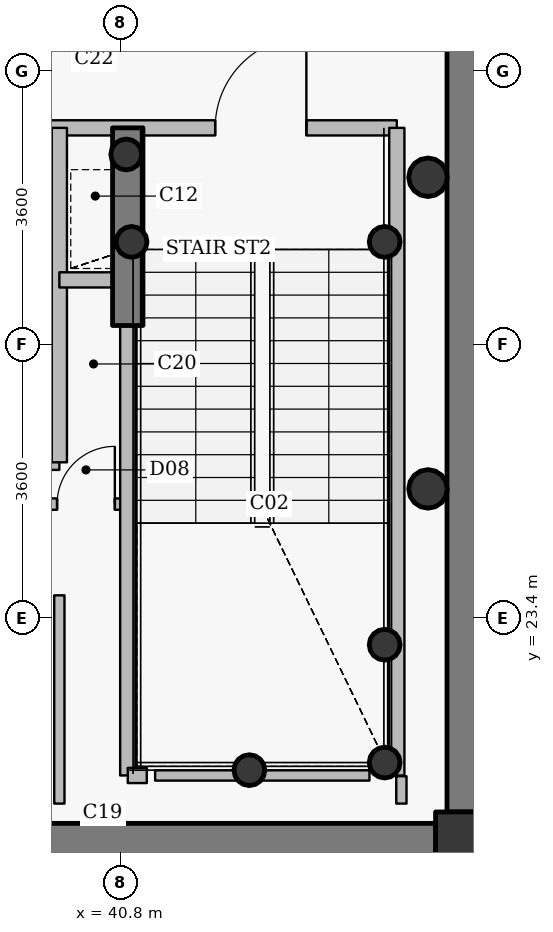
"""IFC4 building model, lengths in metres.
Left out: names, types, materials, properties, quantities, classifications, styles, units other than length and angle.
Written with IfcOpenShell. Run it as: python <this file> out.ifc"""

import sys

from ifc_helpers import new_model, si_unit, direction, frame, frame_2d, origin, origin_2d, place, context, subcontext, project, spatial, rectangle, hollow_circle, extrude, source, transform, mapped, element, fill, save


model = new_model("IFC4")
c1 = context("Model", 3, precision=1e-05, world=origin(), true_north=direction((0.0, 1.0)))
c2 = subcontext(c1, "Body", "Model", "MODEL_VIEW")
j1 = project(units=[si_unit("LENGTHUNIT", "METRE"), si_unit("PLANEANGLEUNIT", "RADIAN")], contexts=[c1])
p1 = place(None, origin())
s1 = spatial("IfcSite", under=j1, at=p1, CompositionType="ELEMENT")
p2 = place(p1, origin())
s2 = spatial("IfcBuilding", under=s1, at=p2, CompositionType="ELEMENT")
p3 = place(p2, frame((0.0, 0.0, 210.3)))
s3 = spatial("IfcBuildingStorey", under=s2, at=p3, CompositionType="ELEMENT", Elevation=210.3)
p4 = place(p3, frame((45.45, 20.35, 0.0), z_axis=(0.0, 0.0, 1.0), x_axis=(1.0, 0.0, 0.0)))
e1 = element("IfcColumn", 1, at=p4, inside=s3, PredefinedType="COLUMN", context=c2, shape_type="SweptSolid", body=[
    extrude(rectangle(XDim=1.0, YDim=1.0, at=origin_2d()), origin(), (0.0, 0.0, 1.0), 3.75),
])
for number, where, z_axis, x_axis in (
    (2, (44.28, 21.5, 0.0), (0.0, 0.0, 1.0), (1.0, 0.0, 0.0)),
    (3, (44.28, 23.05, 0.0), (0.0, 0.0, 1.0), (1.0, 0.0, 0.0)),
    (4, (42.5, 21.4, 0.0), (0.0, 0.0, 1.0), (1.0, 0.0, 0.0)),
    (5, (40.95, 28.35, 0.0), (0.0, 0.0, 1.0), (1.0, 0.0, 0.0)),
    (6, (44.28, 28.35, 0.0), (0.0, 0.0, 1.0), (1.0, 0.0, 0.0)),
    (7, (40.88, 29.5, 0.0), (0.0, 0.0, 1.0), (1.0, 0.0, 0.0)),
):
    element("IfcColumn", number, at=place(p3, frame(where, z_axis=z_axis, x_axis=x_axis)), inside=s3, PredefinedType="COLUMN", context=c2, shape_type="SweptSolid", body=[
        extrude(hollow_circle(Radius=0.203, WallThickness=0.016, at=origin_2d()), origin(), (0.0, 0.0, 1.0), 3.75),
    ])
p5 = place(p3, frame((45.45, 33.15, 0.0), z_axis=(0.0, 0.0, 1.0), x_axis=(0.0, -1.0, 0.0)))
e8 = element("IfcWall", 8, at=p5, inside=s3, PredefinedType="SHEAR", context=c2, shape_type="SweptSolid", body=[
    extrude(rectangle(XDim=12.3, YDim=0.7, at=frame_2d((6.15, 0.0))), origin(), (0.0, 0.0, 1.0), 3.05),
])
p6 = place(p3, frame((44.95, 20.35, 0.0), z_axis=(0.0, 0.0, 1.0), x_axis=(-1.0, 0.0, 0.0)))
e9 = element("IfcWall", 9, at=p6, inside=s3, PredefinedType="SHEAR", context=c2, shape_type="SweptSolid", body=[
    extrude(rectangle(XDim=17.9, YDim=0.7, at=frame_2d((8.95, 0.0))), origin(), (0.0, 0.0, 1.0), 3.05),
])
p7 = place(p6, frame((9.7, 0.0, 0.0)))
e10 = element("IfcOpeningElement", 10, at=p7, cuts=e9, PredefinedType="OPENING", context=c2, shape_type="SweptSolid", body=[
    extrude(rectangle(XDim=1.15, YDim=2.15, at=origin_2d()), frame((0.575, 0.36, 1.075), z_axis=(0.0, -1.0, 0.0), x_axis=(1.0, 0.0, 0.0)), (0.0, 0.0, 1.0), 0.72),
])
p8 = place(p3, frame((40.9, 27.25, 0.0), z_axis=(0.0, 0.0, 1.0), x_axis=(0.0, 1.0, 0.0)))
e11 = element("IfcWall", 11, at=p8, inside=s3, PredefinedType="SHEAR", context=c2, shape_type="SweptSolid", body=[
    extrude(rectangle(XDim=2.6, YDim=0.4, at=frame_2d((1.3, 0.0))), origin(), (0.0, 0.0, 1.0), 3.1),
])
for number, where, z_axis, x_axis in (
    (12, (44.85, 25.1, 0.0), (0.0, 0.0, 1.0), (1.0, 0.0, 0.0)),
    (13, (44.85, 29.2, 0.0), (0.0, 0.0, 1.0), (1.0, 0.0, 0.0)),
):
    element("IfcColumn", number, at=place(p3, frame(where, z_axis=z_axis, x_axis=x_axis)), inside=s3, PredefinedType="COLUMN", context=c2, shape_type="SweptSolid", body=[
        extrude(hollow_circle(Radius=0.254, WallThickness=0.02, at=origin_2d()), origin(), (0.0, 0.0, 1.0), 3.75),
    ])
p9 = place(p3, frame((35.05, 27.25, 0.0), z_axis=(0.0, 0.0, 1.0), x_axis=(1.0, 0.0, 0.0)))
e14 = element("IfcWall", 14, at=p9, inside=s3, PredefinedType="PARTITIONING", context=c2, shape_type="SweptSolid", body=[
    extrude(rectangle(XDim=4.95, YDim=0.2, at=frame_2d((2.475, 0.0))), origin(), (0.0, 0.0, 1.0), 3.085),
])
p10 = place(p3, frame((35.45, 25.45, 0.0), z_axis=(0.0, 0.0, 1.0), x_axis=(1.0, 0.0, 0.0)))
e15 = element("IfcWall", 15, at=p10, inside=s3, PredefinedType="PARTITIONING", context=c2, shape_type="SweptSolid", body=[
    extrude(rectangle(XDim=4.55, YDim=0.2, at=frame_2d((2.275, 0.0))), origin(), (0.0, 0.0, 1.0), 3.085),
])
p11 = place(p3, frame((35.95, 29.85, 0.0), z_axis=(0.0, 0.0, 1.0), x_axis=(1.0, 0.0, 0.0)))
e16 = element("IfcWall", 16, at=p11, inside=s3, PredefinedType="PARTITIONING", context=c2, shape_type="SweptSolid", body=[
    extrude(rectangle(XDim=8.49, YDim=0.2, at=frame_2d((4.245, 0.0))), origin(), (0.0, 0.0, 1.0), 3.085),
])
p12 = place(p11, frame((6.1, 0.0, 0.0)))
e17 = element("IfcOpeningElement", 17, at=p12, cuts=e16, PredefinedType="OPENING", context=c2, shape_type="SweptSolid", body=[
    extrude(rectangle(XDim=1.2, YDim=2.15, at=origin_2d()), frame((0.6, 0.11, 1.075), z_axis=(0.0, -1.0, 0.0), x_axis=(1.0, 0.0, 0.0)), (0.0, 0.0, 1.0), 0.22),
])
p13 = place(p11, frame((0.37, 0.0, 0.0)))
e18 = element("IfcOpeningElement", 18, at=p13, cuts=e16, PredefinedType="OPENING", context=c2, shape_type="SweptSolid", body=[
    extrude(rectangle(XDim=1.15, YDim=2.15, at=origin_2d()), frame((0.575, 0.11, 1.075), z_axis=(0.0, -1.0, 0.0), x_axis=(1.0, 0.0, 0.0)), (0.0, 0.0, 1.0), 0.22),
])
p14 = place(p11, frame((2.425, 0.0, 0.0)))
e19 = element("IfcOpeningElement", 19, at=p14, cuts=e16, PredefinedType="OPENING", context=c2, shape_type="SweptSolid", body=[
    extrude(rectangle(XDim=1.05, YDim=2.15, at=origin_2d()), frame((0.525, 0.11, 1.075), z_axis=(0.0, -1.0, 0.0), x_axis=(1.0, 0.0, 0.0)), (0.0, 0.0, 1.0), 0.22),
])
p15 = place(p3, frame((40.0, 25.45, 0.0), z_axis=(0.0, 0.0, 1.0), x_axis=(0.0, 1.0, 0.0)))
e20 = element("IfcWall", 20, at=p15, inside=s3, PredefinedType="PARTITIONING", context=c2, shape_type="SweptSolid", body=[
    extrude(rectangle(XDim=4.4, YDim=0.2, at=frame_2d((2.2, 0.0))), origin(), (0.0, 0.0, 1.0), 3.5),
])
p16 = place(p3, frame((40.0, 27.85, 0.0), z_axis=(0.0, 0.0, 1.0), x_axis=(1.0, 0.0, 0.0)))
e21 = element("IfcWall", 21, at=p16, inside=s3, PredefinedType="PARTITIONING", context=c2, shape_type="SweptSolid", body=[
    extrude(rectangle(XDim=0.9, YDim=0.2, at=frame_2d((0.45, 0.0))), origin(), (0.0, 0.0, 1.0), 3.5),
])
p17 = place(p3, frame((40.9, 21.33, 0.0), z_axis=(0.0, 0.0, 1.0), x_axis=(0.0, 1.0, 0.0)))
e22 = element("IfcWall", 22, at=p17, inside=s3, PredefinedType="PARTITIONING", context=c2, shape_type="SweptSolid", body=[
    extrude(rectangle(XDim=5.91, YDim=0.2, at=frame_2d((2.955, 0.0))), origin(), (0.0, 0.0, 1.0), 3.035),
])
p18 = place(p3, frame((40.9, 21.33, 0.0), z_axis=(0.0, 0.0, 1.0), x_axis=(1.0, 0.0, 0.0)))
e23 = element("IfcWall", 23, at=p18, inside=s3, PredefinedType="PARTITIONING", context=c2, shape_type="SweptSolid", body=[
    extrude(rectangle(XDim=0.25, YDim=0.2, at=frame_2d((0.125, 0.0))), origin(), (0.0, 0.0, 1.0), 3.035),
])
p19 = place(p3, frame((44.44, 21.33, 0.0), z_axis=(0.0, 0.0, 1.0), x_axis=(0.0, 1.0, 0.0)))
e24 = element("IfcWall", 24, at=p19, inside=s3, PredefinedType="PARTITIONING", context=c2, shape_type="SweptSolid", body=[
    extrude(rectangle(XDim=8.52, YDim=0.2, at=frame_2d((4.26, 0.0))), origin(), (0.0, 0.0, 1.0), 3.5),
])
p20 = place(p3, frame((44.08, 21.33, 0.0), z_axis=(0.0, 0.0, 1.0), x_axis=(-1.0, 0.0, 0.0)))
e25 = element("IfcWall", 25, at=p20, inside=s3, PredefinedType="PARTITIONING", context=c2, shape_type="SweptSolid", body=[
    extrude(rectangle(XDim=2.82, YDim=0.135, at=frame_2d((1.41, 0.0))), origin(), (0.0, 0.0, 1.0), 3.035),
])
p21 = place(p3, frame((40.0, 23.7, 0.0), z_axis=(0.0, 0.0, 1.0), x_axis=(0.0, -1.0, 0.0)))
e26 = element("IfcWall", 26, at=p21, inside=s3, PredefinedType="PARTITIONING", context=c2, shape_type="SweptSolid", body=[
    extrude(rectangle(XDim=2.74, YDim=0.135, at=frame_2d((1.37, 0.0))), origin(), (0.0, 0.0, 1.0), 3.035),
])
p22 = place(p3, frame((44.5, 20.96, 0.0), z_axis=(0.0, 0.0, 1.0), x_axis=(0.0, 1.0, 0.0)))
e27 = element("IfcWall", 27, at=p22, inside=s3, PredefinedType="PARTITIONING", context=c2, shape_type="SweptSolid", body=[
    extrude(rectangle(XDim=0.36, YDim=0.135, at=frame_2d((0.18, 0.0))), origin(), (0.0, 0.0, 1.0), 3.5),
])
m1 = source(origin(), c2, "Body", "SweptSolid", [
    extrude(rectangle(XDim=1.2, YDim=2.15, at=origin_2d()), frame((0.6, 0.025, 1.075), z_axis=(0.0, -1.0, 0.0), x_axis=(1.0, 0.0, 0.0)), (0.0, 0.0, 1.0), 0.05),
])
p23 = place(p12, origin())
e28 = element("IfcDoor", 28, at=p23, inside=s3, OperationType="SINGLE_SWING_LEFT", PredefinedType="DOOR", context=c2, shape_type="MappedRepresentation", body=[
    mapped(m1, transform((0.0, 0.0, 0.0), x_axis=(1.0, 0.0, 0.0), y_axis=(0.0, 1.0, 0.0), z_axis=(0.0, 0.0, 1.0), scale=1.0)),
])
fill(e17, e28)
save(model, sys.argv[1])
